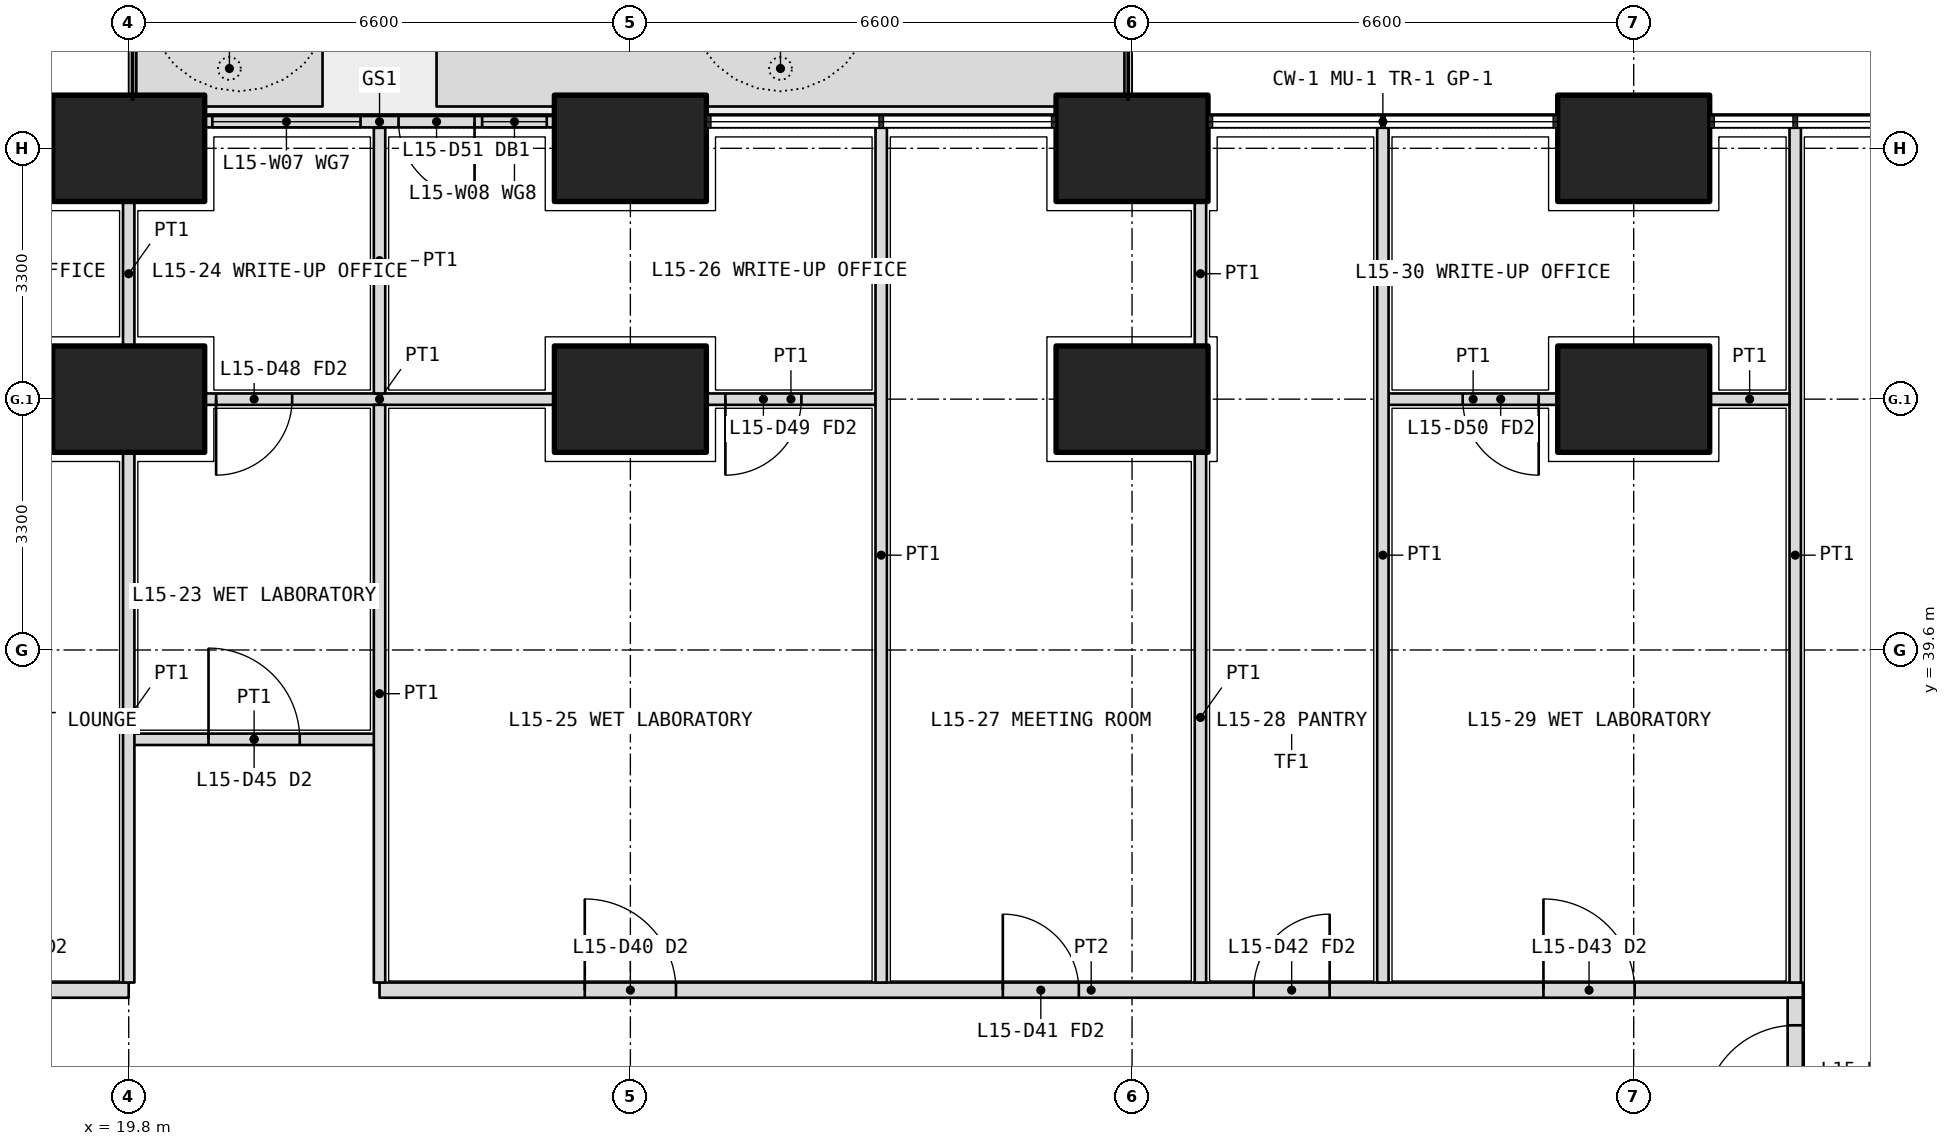
"""IFC4 building model, lengths in metres.
Left out: names, types, materials, properties, quantities, classifications, styles, units other than length and angle.
Written with IfcOpenShell. Run it as: python <this file> out.ifc"""

import sys

from ifc_helpers import new_model, si_unit, direction, frame, frame_2d, origin, origin_2d, place, context, subcontext, project, spatial, polyline, rectangle, outline, extrude, element, fill, save


model = new_model("IFC4")
c1 = context("Model", 3, precision=1e-05, world=origin(), true_north=direction((0.0, 1.0)))
c2 = subcontext(c1, "Body", "Model", "MODEL_VIEW")
j1 = project(units=[si_unit("LENGTHUNIT", "METRE"), si_unit("PLANEANGLEUNIT", "RADIAN")], contexts=[c1])
p1 = place(None, origin())
s1 = spatial("IfcSite", under=j1, at=p1, CompositionType="ELEMENT")
p2 = place(p1, origin())
s2 = spatial("IfcBuilding", under=s1, at=p2, CompositionType="ELEMENT")
p3 = place(p2, frame((0.0, 0.0, 67.5)))
s3 = spatial("IfcBuildingStorey", under=s2, at=p3, CompositionType="ELEMENT", Elevation=67.5)
for number, where, z_axis, x_axis in (
    (1, (19.8, 46.2, 0.0), (0.0, 0.0, 1.0), (1.0, 0.0, 0.0)),
    (2, (26.4, 46.2, 0.0), (0.0, 0.0, 1.0), (1.0, 0.0, 0.0)),
    (3, (33.0, 46.2, 0.0), (0.0, 0.0, 1.0), (1.0, 0.0, 0.0)),
    (4, (39.6, 46.2, 0.0), (0.0, 0.0, 1.0), (1.0, 0.0, 0.0)),
    (5, (19.8, 42.9, 0.0), (0.0, 0.0, 1.0), (1.0, 0.0, 0.0)),
    (6, (26.4, 42.9, 0.0), (0.0, 0.0, 1.0), (1.0, 0.0, 0.0)),
    (7, (33.0, 42.9, 0.0), (0.0, 0.0, 1.0), (1.0, 0.0, 0.0)),
    (8, (39.6, 42.9, 0.0), (0.0, 0.0, 1.0), (1.0, 0.0, 0.0)),
):
    element("IfcColumn", number, at=place(p3, frame(where, z_axis=z_axis, x_axis=x_axis)), inside=s3, PredefinedType="COLUMN", context=c2, shape_type="SweptSolid", body=[
        extrude(rectangle(XDim=2.0, YDim=1.4, at=origin_2d()), origin(), (0.0, 0.0, 1.0), 4.2),
    ])
p4 = place(p3, origin())
e9 = element("IfcWall", 9, at=p4, inside=s3, PredefinedType="USERDEFINED", context=c2, shape_type="SweptSolid", body=[
    extrude(outline(polyline([(19.9, 46.75), (22.35, 46.75), (22.35, 47.75), (19.9, 47.75), (19.9, 46.75)]), holes=[polyline([(20.05, 46.9), (22.2, 46.9), (22.2, 47.6), (20.05, 47.6), (20.05, 46.9)])]), origin(), (0.0, 0.0, 1.0), 1.05),
])
p5 = place(p3, origin())
e10 = element("IfcWall", 10, at=p5, inside=s3, PredefinedType="USERDEFINED", context=c2, shape_type="SweptSolid", body=[
    extrude(outline(polyline([(23.85, 46.75), (32.9, 46.75), (32.9, 47.75), (23.85, 47.75), (23.85, 46.75)]), holes=[polyline([(24.0, 46.9), (32.75, 46.9), (32.75, 47.6), (24.0, 47.6), (24.0, 46.9)])]), origin(), (0.0, 0.0, 1.0), 1.05),
])
p6 = place(p3, frame((25.4, 46.55, 0.0), z_axis=(0.0, 0.0, 1.0), x_axis=(-1.0, 0.0, 0.0)))
e11 = element("IfcWall", 11, at=p6, inside=s3, PredefinedType="SOLIDWALL", context=c2, shape_type="SweptSolid", body=[
    extrude(rectangle(XDim=4.6, YDim=0.15, at=frame_2d((2.3, 0.0))), origin(), (0.0, 0.0, 1.0), 2.6),
])
p7 = place(p6, frame((1.05, 0.0, 0.0)))
e12 = element("IfcOpeningElement", 12, at=p7, cuts=e11, PredefinedType="OPENING", context=c2, shape_type="SweptSolid", body=[
    extrude(rectangle(XDim=1.0, YDim=2.4, at=frame_2d((0.5, 1.2))), frame((0.0, 0.085, 0.0), z_axis=(0.0, -1.0, 0.0), x_axis=(1.0, 0.0, 0.0)), (0.0, 0.0, 1.0), 0.17),
])
p8 = place(p6, frame((0.1, 0.0, 0.1)))
e13 = element("IfcOpeningElement", 13, at=p8, cuts=e11, PredefinedType="OPENING", context=c2, shape_type="SweptSolid", body=[
    extrude(rectangle(XDim=0.85, YDim=2.2, at=frame_2d((0.425, 1.1))), frame((0.0, 0.085, 0.0), z_axis=(0.0, -1.0, 0.0), x_axis=(1.0, 0.0, 0.0)), (0.0, 0.0, 1.0), 0.17),
])
p9 = place(p6, frame((2.55, 0.0, 0.1)))
e14 = element("IfcOpeningElement", 14, at=p9, cuts=e11, PredefinedType="OPENING", context=c2, shape_type="SweptSolid", body=[
    extrude(rectangle(XDim=1.95, YDim=2.2, at=frame_2d((0.975, 1.1))), frame((0.0, 0.085, 0.0), z_axis=(0.0, -1.0, 0.0), x_axis=(1.0, 0.0, 0.0)), (0.0, 0.0, 1.0), 0.17),
])
p10 = place(p3, frame((10.975, 35.125, 0.0), z_axis=(0.0, 0.0, 1.0), x_axis=(1.0, 0.0, 0.0)))
e15 = element("IfcWall", 15, at=p10, inside=s3, PredefinedType="PARTITIONING", context=c2, shape_type="SweptSolid", body=[
    extrude(rectangle(XDim=8.825, YDim=0.2, at=frame_2d((4.413, 0.0))), origin(), (0.0, 0.0, 1.0), 2.85),
])
p11 = place(p10, frame((2.312, 0.0, 0.0)))
e16 = element("IfcOpeningElement", 16, at=p11, cuts=e15, PredefinedType="OPENING", context=c2, shape_type="SweptSolid", body=[
    extrude(rectangle(XDim=1.0, YDim=2.1, at=frame_2d((0.5, 1.05))), frame((0.0, 0.11, 0.0), z_axis=(0.0, -1.0, 0.0), x_axis=(1.0, 0.0, 0.0)), (0.0, 0.0, 1.0), 0.22),
])
p12 = place(p10, frame((6.675, 0.0, 0.0)))
e17 = element("IfcOpeningElement", 17, at=p12, cuts=e15, PredefinedType="OPENING", context=c2, shape_type="SweptSolid", body=[
    extrude(rectangle(XDim=1.0, YDim=2.1, at=frame_2d((0.5, 1.05))), frame((0.0, 0.11, 0.0), z_axis=(0.0, -1.0, 0.0), x_axis=(1.0, 0.0, 0.0)), (0.0, 0.0, 1.0), 0.22),
])
p13 = place(p3, frame((23.1, 35.125, 0.0), z_axis=(0.0, 0.0, 1.0), x_axis=(1.0, 0.0, 0.0)))
e18 = element("IfcWall", 18, at=p13, inside=s3, PredefinedType="PARTITIONING", context=c2, shape_type="SweptSolid", body=[
    extrude(rectangle(XDim=18.725, YDim=0.2, at=frame_2d((9.362, 0.0))), origin(), (0.0, 0.0, 1.0), 2.85),
])
p14 = place(p13, frame((2.7, 0.0, 0.0)))
e19 = element("IfcOpeningElement", 19, at=p14, cuts=e18, PredefinedType="OPENING", context=c2, shape_type="SweptSolid", body=[
    extrude(rectangle(XDim=1.2, YDim=2.1, at=frame_2d((0.6, 1.05))), frame((0.0, 0.11, 0.0), z_axis=(0.0, -1.0, 0.0), x_axis=(1.0, 0.0, 0.0)), (0.0, 0.0, 1.0), 0.22),
])
p15 = place(p13, frame((8.2, 0.0, 0.0)))
e20 = element("IfcOpeningElement", 20, at=p15, cuts=e18, PredefinedType="OPENING", context=c2, shape_type="SweptSolid", body=[
    extrude(rectangle(XDim=1.0, YDim=2.1, at=frame_2d((0.5, 1.05))), frame((0.0, 0.11, 0.0), z_axis=(0.0, -1.0, 0.0), x_axis=(1.0, 0.0, 0.0)), (0.0, 0.0, 1.0), 0.22),
])
p16 = place(p13, frame((11.5, 0.0, 0.0)))
e21 = element("IfcOpeningElement", 21, at=p16, cuts=e18, PredefinedType="OPENING", context=c2, shape_type="SweptSolid", body=[
    extrude(rectangle(XDim=1.0, YDim=2.1, at=frame_2d((0.5, 1.05))), frame((0.0, 0.11, 0.0), z_axis=(0.0, -1.0, 0.0), x_axis=(1.0, 0.0, 0.0)), (0.0, 0.0, 1.0), 0.22),
])
p17 = place(p13, frame((15.312, 0.0, 0.0)))
e22 = element("IfcOpeningElement", 22, at=p17, cuts=e18, PredefinedType="OPENING", context=c2, shape_type="SweptSolid", body=[
    extrude(rectangle(XDim=1.2, YDim=2.1, at=frame_2d((0.6, 1.05))), frame((0.0, 0.11, 0.0), z_axis=(0.0, -1.0, 0.0), x_axis=(1.0, 0.0, 0.0)), (0.0, 0.0, 1.0), 0.22),
])
p18 = place(p3, frame((41.725, 11.175, 0.0), z_axis=(0.0, 0.0, 1.0), x_axis=(0.0, 1.0, 0.0)))
e23 = element("IfcWall", 23, at=p18, inside=s3, PredefinedType="PARTITIONING", context=c2, shape_type="SweptSolid", body=[
    extrude(rectangle(XDim=23.85, YDim=0.2, at=frame_2d((11.925, 0.0))), origin(), (0.0, 0.0, 1.0), 2.85),
])
p19 = place(p18, frame((3.762, 0.0, 0.0)))
e24 = element("IfcOpeningElement", 24, at=p19, cuts=e23, PredefinedType="OPENING", context=c2, shape_type="SweptSolid", body=[
    extrude(rectangle(XDim=1.0, YDim=2.1, at=frame_2d((0.5, 1.05))), frame((0.0, 0.11, 0.0), z_axis=(0.0, -1.0, 0.0), x_axis=(1.0, 0.0, 0.0)), (0.0, 0.0, 1.0), 0.22),
])
p20 = place(p18, frame((9.725, 0.0, 0.0)))
e25 = element("IfcOpeningElement", 25, at=p20, cuts=e23, PredefinedType="OPENING", context=c2, shape_type="SweptSolid", body=[
    extrude(rectangle(XDim=1.0, YDim=2.1, at=frame_2d((0.5, 1.05))), frame((0.0, 0.11, 0.0), z_axis=(0.0, -1.0, 0.0), x_axis=(1.0, 0.0, 0.0)), (0.0, 0.0, 1.0), 0.22),
])
p21 = place(p18, frame((13.075, 0.0, 0.0)))
e26 = element("IfcOpeningElement", 26, at=p21, cuts=e23, PredefinedType="OPENING", context=c2, shape_type="SweptSolid", body=[
    extrude(rectangle(XDim=0.9, YDim=2.1, at=frame_2d((0.45, 1.05))), frame((0.0, 0.11, 0.0), z_axis=(0.0, -1.0, 0.0), x_axis=(1.0, 0.0, 0.0)), (0.0, 0.0, 1.0), 0.22),
])
p22 = place(p18, frame((16.275, 0.0, 0.0)))
e27 = element("IfcOpeningElement", 27, at=p22, cuts=e23, PredefinedType="OPENING", context=c2, shape_type="SweptSolid", body=[
    extrude(rectangle(XDim=1.2, YDim=2.1, at=frame_2d((0.6, 1.05))), frame((0.0, 0.11, 0.0), z_axis=(0.0, -1.0, 0.0), x_axis=(1.0, 0.0, 0.0)), (0.0, 0.0, 1.0), 0.22),
])
p23 = place(p18, frame((19.575, 0.0, 0.0)))
e28 = element("IfcOpeningElement", 28, at=p23, cuts=e23, PredefinedType="OPENING", context=c2, shape_type="SweptSolid", body=[
    extrude(rectangle(XDim=1.2, YDim=2.1, at=frame_2d((0.6, 1.05))), frame((0.0, 0.11, 0.0), z_axis=(0.0, -1.0, 0.0), x_axis=(1.0, 0.0, 0.0)), (0.0, 0.0, 1.0), 0.22),
])
p24 = place(p18, frame((22.288, 0.0, 0.0)))
e29 = element("IfcOpeningElement", 29, at=p24, cuts=e23, PredefinedType="OPENING", context=c2, shape_type="SweptSolid", body=[
    extrude(rectangle(XDim=1.2, YDim=2.1, at=frame_2d((0.6, 1.05))), frame((0.0, 0.11, 0.0), z_axis=(0.0, -1.0, 0.0), x_axis=(1.0, 0.0, 0.0)), (0.0, 0.0, 1.0), 0.22),
])
p25 = place(p3, frame((41.725, 46.47, 0.0), z_axis=(0.0, 0.0, 1.0), x_axis=(0.0, -1.0, 0.0)))
e30 = element("IfcWall", 30, at=p25, inside=s3, PredefinedType="PARTITIONING", context=c2, shape_type="SweptSolid", body=[
    extrude(rectangle(XDim=11.245, YDim=0.15, at=frame_2d((5.623, 0.0))), origin(), (0.0, 0.0, 1.0), 2.6),
])
p26 = place(p3, frame((41.65, 42.9, 0.0), z_axis=(0.0, 0.0, 1.0), x_axis=(-1.0, 0.0, 0.0)))
e31 = element("IfcWall", 31, at=p26, inside=s3, PredefinedType="PARTITIONING", context=c2, shape_type="SweptSolid", body=[
    extrude(rectangle(XDim=1.05, YDim=0.15, at=frame_2d((0.525, 0.0))), origin(), (0.0, 0.0, 1.0), 3.9),
])
p27 = place(p3, frame((38.6, 42.9, 0.0), z_axis=(0.0, 0.0, 1.0), x_axis=(-1.0, 0.0, 0.0)))
e32 = element("IfcWall", 32, at=p27, inside=s3, PredefinedType="PARTITIONING", context=c2, shape_type="SweptSolid", body=[
    extrude(rectangle(XDim=2.225, YDim=0.15, at=frame_2d((1.113, 0.0))), origin(), (0.0, 0.0, 1.0), 3.9),
])
p28 = place(p27, frame((0.25, 0.0, 0.0)))
e33 = element("IfcOpeningElement", 33, at=p28, cuts=e32, PredefinedType="OPENING", context=c2, shape_type="SweptSolid", body=[
    extrude(rectangle(XDim=1.0, YDim=2.1, at=frame_2d((0.5, 1.05))), frame((0.0, 0.085, 0.0), z_axis=(0.0, -1.0, 0.0), x_axis=(1.0, 0.0, 0.0)), (0.0, 0.0, 1.0), 0.17),
])
p29 = place(p3, frame((29.625, 42.9, 0.0), z_axis=(0.0, 0.0, 1.0), x_axis=(-1.0, 0.0, 0.0)))
e34 = element("IfcWall", 34, at=p29, inside=s3, PredefinedType="PARTITIONING", context=c2, shape_type="SweptSolid", body=[
    extrude(rectangle(XDim=2.225, YDim=0.15, at=frame_2d((1.113, 0.0))), origin(), (0.0, 0.0, 1.0), 3.9),
])
p30 = place(p29, frame((0.975, 0.0, 0.0)))
e35 = element("IfcOpeningElement", 35, at=p30, cuts=e34, PredefinedType="OPENING", context=c2, shape_type="SweptSolid", body=[
    extrude(rectangle(XDim=1.0, YDim=2.1, at=frame_2d((0.5, 1.05))), frame((0.0, 0.085, 0.0), z_axis=(0.0, -1.0, 0.0), x_axis=(1.0, 0.0, 0.0)), (0.0, 0.0, 1.0), 0.17),
])
p31 = place(p3, frame((25.4, 42.9, 0.0), z_axis=(0.0, 0.0, 1.0), x_axis=(-1.0, 0.0, 0.0)))
e36 = element("IfcWall", 36, at=p31, inside=s3, PredefinedType="PARTITIONING", context=c2, shape_type="SweptSolid", body=[
    extrude(rectangle(XDim=4.6, YDim=0.15, at=frame_2d((2.3, 0.0))), origin(), (0.0, 0.0, 1.0), 3.9),
])
p32 = place(p31, frame((3.45, 0.0, 0.0)))
e37 = element("IfcOpeningElement", 37, at=p32, cuts=e36, PredefinedType="OPENING", context=c2, shape_type="SweptSolid", body=[
    extrude(rectangle(XDim=1.0, YDim=2.1, at=frame_2d((0.5, 1.05))), frame((0.0, 0.085, 0.0), z_axis=(0.0, -1.0, 0.0), x_axis=(1.0, 0.0, 0.0)), (0.0, 0.0, 1.0), 0.17),
])
p33 = place(p3, frame((19.8, 38.425, 0.0), z_axis=(0.0, 0.0, 1.0), x_axis=(1.0, 0.0, 0.0)))
e38 = element("IfcWall", 38, at=p33, inside=s3, PredefinedType="PARTITIONING", context=c2, shape_type="SweptSolid", body=[
    extrude(rectangle(XDim=3.3, YDim=0.15, at=frame_2d((1.65, 0.0))), origin(), (0.0, 0.0, 1.0), 2.85),
])
p34 = place(p33, frame((1.05, 0.0, 0.0)))
e39 = element("IfcOpeningElement", 39, at=p34, cuts=e38, PredefinedType="OPENING", context=c2, shape_type="SweptSolid", body=[
    extrude(rectangle(XDim=1.2, YDim=2.1, at=frame_2d((0.6, 1.05))), frame((0.0, 0.085, 0.0), z_axis=(0.0, -1.0, 0.0), x_axis=(1.0, 0.0, 0.0)), (0.0, 0.0, 1.0), 0.17),
])
p35 = place(p3, frame((33.9, 45.5, 0.0), z_axis=(0.0, 0.0, 1.0), x_axis=(0.0, -1.0, 0.0)))
e40 = element("IfcWall", 40, at=p35, inside=s3, PredefinedType="PARTITIONING", context=c2, shape_type="SweptSolid", body=[
    extrude(rectangle(XDim=1.9, YDim=0.15, at=frame_2d((0.95, 0.0))), origin(), (0.0, 0.0, 1.0), 2.85),
])
p36 = place(p3, frame((33.9, 42.2, 0.0), z_axis=(0.0, 0.0, 1.0), x_axis=(0.0, -1.0, 0.0)))
e41 = element("IfcWall", 41, at=p36, inside=s3, PredefinedType="PARTITIONING", context=c2, shape_type="SweptSolid", body=[
    extrude(rectangle(XDim=6.975, YDim=0.15, at=frame_2d((3.487, 0.0))), origin(), (0.0, 0.0, 1.0), 3.9),
])
p37 = place(p3, frame((36.3, 46.47, 0.0), z_axis=(0.0, 0.0, 1.0), x_axis=(0.0, -1.0, 0.0)))
e42 = element("IfcWall", 42, at=p37, inside=s3, PredefinedType="PARTITIONING", context=c2, shape_type="SweptSolid", body=[
    extrude(rectangle(XDim=11.245, YDim=0.15, at=frame_2d((5.623, 0.0))), origin(), (0.0, 0.0, 1.0), 2.6),
])
p38 = place(p3, frame((19.8, 45.5, 0.0), z_axis=(0.0, 0.0, 1.0), x_axis=(0.0, -1.0, 0.0)))
e43 = element("IfcWall", 43, at=p38, inside=s3, PredefinedType="PARTITIONING", context=c2, shape_type="SweptSolid", body=[
    extrude(rectangle(XDim=1.9, YDim=0.15, at=frame_2d((0.95, 0.0))), origin(), (0.0, 0.0, 1.0), 2.85),
])
p39 = place(p3, frame((19.8, 42.2, 0.0), z_axis=(0.0, 0.0, 1.0), x_axis=(0.0, -1.0, 0.0)))
e44 = element("IfcWall", 44, at=p39, inside=s3, PredefinedType="PARTITIONING", context=c2, shape_type="SweptSolid", body=[
    extrude(rectangle(XDim=6.975, YDim=0.15, at=frame_2d((3.487, 0.0))), origin(), (0.0, 0.0, 1.0), 2.85),
])
p40 = place(p3, frame((23.1, 46.47, 0.0), z_axis=(0.0, 0.0, 1.0), x_axis=(0.0, -1.0, 0.0)))
e45 = element("IfcWall", 45, at=p40, inside=s3, PredefinedType="PARTITIONING", context=c2, shape_type="SweptSolid", body=[
    extrude(rectangle(XDim=3.495, YDim=0.15, at=frame_2d((1.748, 0.0))), origin(), (0.0, 0.0, 1.0), 2.6),
])
p41 = place(p3, frame((23.1, 42.825, 0.0), z_axis=(0.0, 0.0, 1.0), x_axis=(0.0, -1.0, 0.0)))
e46 = element("IfcWall", 46, at=p41, inside=s3, PredefinedType="PARTITIONING", context=c2, shape_type="SweptSolid", body=[
    extrude(rectangle(XDim=7.6, YDim=0.15, at=frame_2d((3.8, 0.0))), origin(), (0.0, 0.0, 1.0), 3.9),
])
p42 = place(p3, frame((29.7, 46.47, 0.0), z_axis=(0.0, 0.0, 1.0), x_axis=(0.0, -1.0, 0.0)))
e47 = element("IfcWall", 47, at=p42, inside=s3, PredefinedType="PARTITIONING", context=c2, shape_type="SweptSolid", body=[
    extrude(rectangle(XDim=11.245, YDim=0.15, at=frame_2d((5.623, 0.0))), origin(), (0.0, 0.0, 1.0), 2.6),
])
p43 = place(p7, origin())
e48 = element("IfcDoor", 48, at=p43, inside=s3, OperationType="SINGLE_SWING_LEFT", PredefinedType="DOOR", context=c2, shape_type="SweptSolid", body=[
    extrude(rectangle(XDim=1.0, YDim=2.4, at=frame_2d((0.5, 1.2))), frame((0.0, 0.025, 0.0), z_axis=(0.0, -1.0, 0.0), x_axis=(1.0, 0.0, 0.0)), (0.0, 0.0, 1.0), 0.05),
])
fill(e12, e48)
p44 = place(p8, origin())
e49 = element("IfcWindow", 49, at=p44, inside=s3, PartitioningType="SINGLE_PANEL", PredefinedType="WINDOW", context=c2, shape_type="SweptSolid", body=[
    extrude(rectangle(XDim=0.85, YDim=2.2, at=frame_2d((0.425, 1.1))), frame((0.0, 0.03, 0.0), z_axis=(0.0, -1.0, 0.0), x_axis=(1.0, 0.0, 0.0)), (0.0, 0.0, 1.0), 0.06),
])
fill(e13, e49)
p45 = place(p9, origin())
e50 = element("IfcWindow", 50, at=p45, inside=s3, PartitioningType="SINGLE_PANEL", PredefinedType="WINDOW", context=c2, shape_type="SweptSolid", body=[
    extrude(rectangle(XDim=1.95, YDim=2.2, at=frame_2d((0.975, 1.1))), frame((0.0, 0.03, 0.0), z_axis=(0.0, -1.0, 0.0), x_axis=(1.0, 0.0, 0.0)), (0.0, 0.0, 1.0), 0.06),
])
fill(e14, e50)
p46 = place(p24, origin())
e51 = element("IfcDoor", 51, at=p46, inside=s3, OperationType="DOUBLE_DOOR_SINGLE_SWING", PredefinedType="DOOR", context=c2, shape_type="SweptSolid", body=[
    extrude(rectangle(XDim=1.2, YDim=2.1, at=frame_2d((0.6, 1.05))), frame((0.0, 0.025, 0.0), z_axis=(0.0, -1.0, 0.0), x_axis=(1.0, 0.0, 0.0)), (0.0, 0.0, 1.0), 0.05),
])
fill(e29, e51)
p47 = place(p34, origin())
e52 = element("IfcDoor", 52, at=p47, inside=s3, OperationType="DOUBLE_DOOR_SINGLE_SWING", PredefinedType="DOOR", context=c2, shape_type="SweptSolid", body=[
    extrude(rectangle(XDim=1.2, YDim=2.1, at=frame_2d((0.6, 1.05))), frame((0.0, 0.025, 0.0), z_axis=(0.0, -1.0, 0.0), x_axis=(1.0, 0.0, 0.0)), (0.0, 0.0, 1.0), 0.05),
])
fill(e39, e52)
p48 = place(p32, origin())
e53 = element("IfcDoor", 53, at=p48, inside=s3, OperationType="SINGLE_SWING_RIGHT", PredefinedType="DOOR", context=c2, shape_type="SweptSolid", body=[
    extrude(rectangle(XDim=1.0, YDim=2.1, at=frame_2d((0.5, 1.05))), frame((0.0, 0.025, 0.0), z_axis=(0.0, -1.0, 0.0), x_axis=(1.0, 0.0, 0.0)), (0.0, 0.0, 1.0), 0.05),
])
fill(e37, e53)
p49 = place(p14, origin())
e54 = element("IfcDoor", 54, at=p49, inside=s3, OperationType="DOUBLE_DOOR_SINGLE_SWING", PredefinedType="DOOR", context=c2, shape_type="SweptSolid", body=[
    extrude(rectangle(XDim=1.2, YDim=2.1, at=frame_2d((0.6, 1.05))), frame((0.0, 0.025, 0.0), z_axis=(0.0, -1.0, 0.0), x_axis=(1.0, 0.0, 0.0)), (0.0, 0.0, 1.0), 0.05),
])
fill(e19, e54)
p50 = place(p30, origin())
e55 = element("IfcDoor", 55, at=p50, inside=s3, OperationType="SINGLE_SWING_RIGHT", PredefinedType="DOOR", context=c2, shape_type="SweptSolid", body=[
    extrude(rectangle(XDim=1.0, YDim=2.1, at=frame_2d((0.5, 1.05))), frame((0.0, 0.025, 0.0), z_axis=(0.0, -1.0, 0.0), x_axis=(1.0, 0.0, 0.0)), (0.0, 0.0, 1.0), 0.05),
])
fill(e35, e55)
p51 = place(p15, origin())
e56 = element("IfcDoor", 56, at=p51, inside=s3, OperationType="SINGLE_SWING_LEFT", PredefinedType="DOOR", context=c2, shape_type="SweptSolid", body=[
    extrude(rectangle(XDim=1.0, YDim=2.1, at=frame_2d((0.5, 1.05))), frame((0.0, 0.025, 0.0), z_axis=(0.0, -1.0, 0.0), x_axis=(1.0, 0.0, 0.0)), (0.0, 0.0, 1.0), 0.05),
])
fill(e20, e56)
p52 = place(p16, origin())
e57 = element("IfcDoor", 57, at=p52, inside=s3, OperationType="SINGLE_SWING_RIGHT", PredefinedType="DOOR", context=c2, shape_type="SweptSolid", body=[
    extrude(rectangle(XDim=1.0, YDim=2.1, at=frame_2d((0.5, 1.05))), frame((0.0, 0.025, 0.0), z_axis=(0.0, -1.0, 0.0), x_axis=(1.0, 0.0, 0.0)), (0.0, 0.0, 1.0), 0.05),
])
fill(e21, e57)
p53 = place(p17, origin())
e58 = element("IfcDoor", 58, at=p53, inside=s3, OperationType="DOUBLE_DOOR_SINGLE_SWING", PredefinedType="DOOR", context=c2, shape_type="SweptSolid", body=[
    extrude(rectangle(XDim=1.2, YDim=2.1, at=frame_2d((0.6, 1.05))), frame((0.0, 0.025, 0.0), z_axis=(0.0, -1.0, 0.0), x_axis=(1.0, 0.0, 0.0)), (0.0, 0.0, 1.0), 0.05),
])
fill(e22, e58)
p54 = place(p28, origin())
e59 = element("IfcDoor", 59, at=p54, inside=s3, OperationType="SINGLE_SWING_LEFT", PredefinedType="DOOR", context=c2, shape_type="SweptSolid", body=[
    extrude(rectangle(XDim=1.0, YDim=2.1, at=frame_2d((0.5, 1.05))), frame((0.0, 0.025, 0.0), z_axis=(0.0, -1.0, 0.0), x_axis=(1.0, 0.0, 0.0)), (0.0, 0.0, 1.0), 0.05),
])
fill(e33, e59)
save(model, sys.argv[1])
